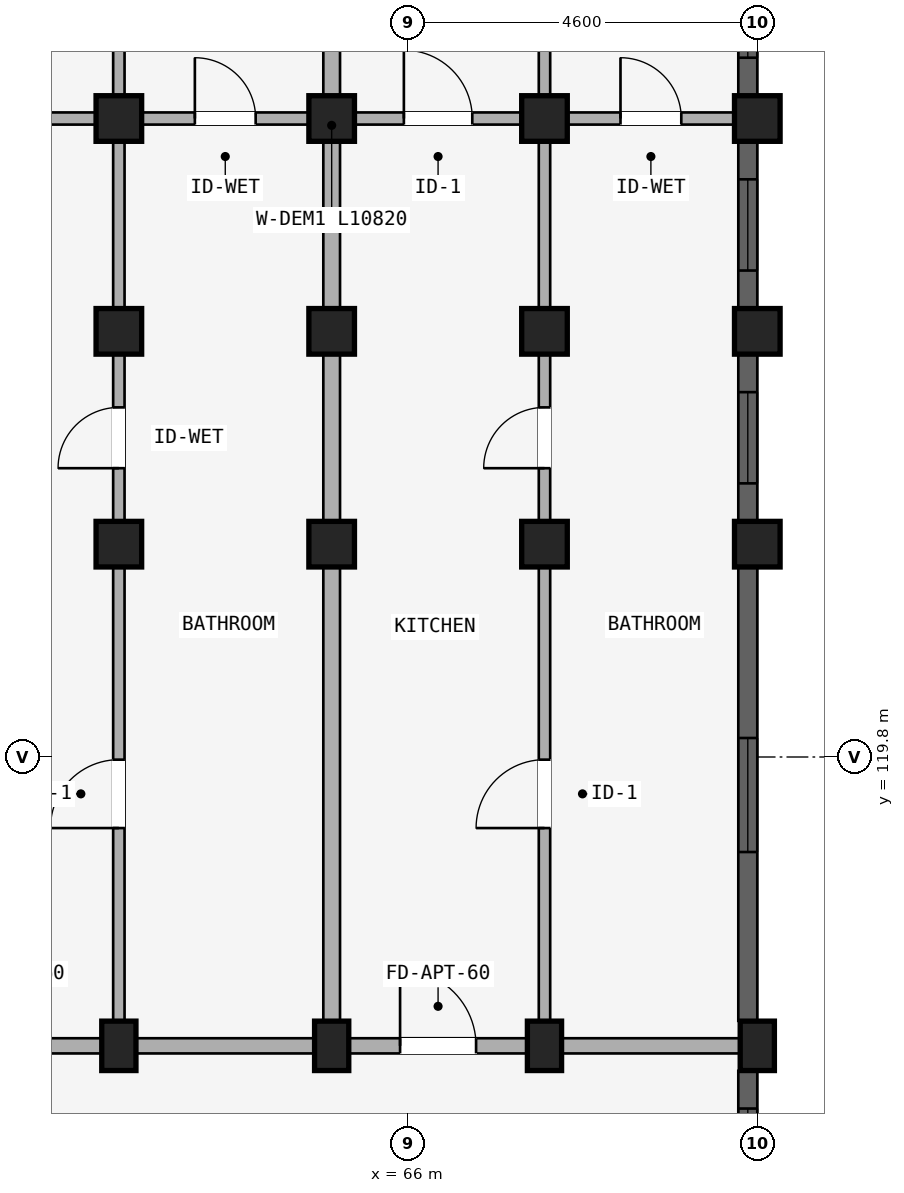
"""IFC4 building model, lengths in metres.
Left out: names, types, materials, properties, quantities, classifications, styles, units other than length and angle.
Written with IfcOpenShell. Run it as: python <this file> out.ifc"""

import sys

from ifc_helpers import new_model, si_unit, direction, frame, frame_2d, origin, origin_2d, place, context, subcontext, project, spatial, rectangle, extrude, element, fill, save


model = new_model("IFC4")
c1 = context("Model", 3, precision=1e-05, world=origin(), true_north=direction((0.0, 1.0)))
c2 = subcontext(c1, "Body", "Model", "MODEL_VIEW")
j1 = project(units=[si_unit("LENGTHUNIT", "METRE"), si_unit("PLANEANGLEUNIT", "RADIAN")], contexts=[c1])
p1 = place(None, origin())
s1 = spatial("IfcSite", under=j1, at=p1, CompositionType="ELEMENT")
p2 = place(p1, origin())
s2 = spatial("IfcBuilding", under=s1, at=p2, CompositionType="ELEMENT")
p3 = place(p2, frame((0.0, 0.0, 30.75)))
s3 = spatial("IfcBuildingStorey", under=s2, at=p3, CompositionType="ELEMENT", Elevation=30.75)
p4 = place(p3, frame((62.2, 116.0, 0.0), z_axis=(0.0, 0.0, 1.0), x_axis=(1.0, 0.0, 0.0)))
e1 = element("IfcColumn", 1, at=p4, inside=s3, PredefinedType="COLUMN", context=c2, shape_type="SweptSolid", body=[
    extrude(rectangle(XDim=0.45, YDim=0.65, at=origin_2d()), origin(), (0.0, 0.0, 1.0), 2.93),
])
for number, where, z_axis, x_axis in (
    (2, (62.2, 122.6, 0.0), (0.0, 0.0, 1.0), (1.0, 0.0, 0.0)),
    (3, (62.2, 125.4, 0.0), (0.0, 0.0, 1.0), (1.0, 0.0, 0.0)),
    (4, (62.2, 128.2, 0.0), (0.0, 0.0, 1.0), (1.0, 0.0, 0.0)),
):
    element("IfcColumn", number, at=place(p3, frame(where, z_axis=z_axis, x_axis=x_axis)), inside=s3, PredefinedType="COLUMN", context=c2, shape_type="SweptSolid", body=[
        extrude(rectangle(XDim=0.6, YDim=0.6, at=origin_2d()), origin(), (0.0, 0.0, 1.0), 2.93),
    ])
p5 = place(p3, frame((65.0, 116.0, 0.0), z_axis=(0.0, 0.0, 1.0), x_axis=(1.0, 0.0, 0.0)))
e5 = element("IfcColumn", 5, at=p5, inside=s3, PredefinedType="COLUMN", context=c2, shape_type="SweptSolid", body=[
    extrude(rectangle(XDim=0.45, YDim=0.65, at=origin_2d()), origin(), (0.0, 0.0, 1.0), 2.93),
])
for number, where, z_axis, x_axis in (
    (6, (65.0, 122.6, 0.0), (0.0, 0.0, 1.0), (1.0, 0.0, 0.0)),
    (7, (65.0, 125.4, 0.0), (0.0, 0.0, 1.0), (1.0, 0.0, 0.0)),
    (8, (65.0, 128.2, 0.0), (0.0, 0.0, 1.0), (1.0, 0.0, 0.0)),
):
    element("IfcColumn", number, at=place(p3, frame(where, z_axis=z_axis, x_axis=x_axis)), inside=s3, PredefinedType="COLUMN", context=c2, shape_type="SweptSolid", body=[
        extrude(rectangle(XDim=0.6, YDim=0.6, at=origin_2d()), origin(), (0.0, 0.0, 1.0), 2.93),
    ])
p6 = place(p3, frame((67.8, 116.0, 0.0), z_axis=(0.0, 0.0, 1.0), x_axis=(1.0, 0.0, 0.0)))
e9 = element("IfcColumn", 9, at=p6, inside=s3, PredefinedType="COLUMN", context=c2, shape_type="SweptSolid", body=[
    extrude(rectangle(XDim=0.45, YDim=0.65, at=origin_2d()), origin(), (0.0, 0.0, 1.0), 2.93),
])
for number, where, z_axis, x_axis in (
    (10, (67.8, 122.6, 0.0), (0.0, 0.0, 1.0), (1.0, 0.0, 0.0)),
    (11, (67.8, 125.4, 0.0), (0.0, 0.0, 1.0), (1.0, 0.0, 0.0)),
    (12, (67.8, 128.2, 0.0), (0.0, 0.0, 1.0), (1.0, 0.0, 0.0)),
):
    element("IfcColumn", number, at=place(p3, frame(where, z_axis=z_axis, x_axis=x_axis)), inside=s3, PredefinedType="COLUMN", context=c2, shape_type="SweptSolid", body=[
        extrude(rectangle(XDim=0.6, YDim=0.6, at=origin_2d()), origin(), (0.0, 0.0, 1.0), 2.93),
    ])
p7 = place(p3, frame((70.6, 116.0, 0.0), z_axis=(0.0, 0.0, 1.0), x_axis=(1.0, 0.0, 0.0)))
e13 = element("IfcColumn", 13, at=p7, inside=s3, PredefinedType="COLUMN", context=c2, shape_type="SweptSolid", body=[
    extrude(rectangle(XDim=0.45, YDim=0.65, at=origin_2d()), origin(), (0.0, 0.0, 1.0), 2.93),
])
for number, where, z_axis, x_axis in (
    (14, (70.6, 122.6, 0.0), (0.0, 0.0, 1.0), (1.0, 0.0, 0.0)),
    (15, (70.6, 125.4, 0.0), (0.0, 0.0, 1.0), (1.0, 0.0, 0.0)),
    (16, (70.6, 128.2, 0.0), (0.0, 0.0, 1.0), (1.0, 0.0, 0.0)),
):
    element("IfcColumn", number, at=place(p3, frame(where, z_axis=z_axis, x_axis=x_axis)), inside=s3, PredefinedType="COLUMN", context=c2, shape_type="SweptSolid", body=[
        extrude(rectangle(XDim=0.6, YDim=0.6, at=origin_2d()), origin(), (0.0, 0.0, 1.0), 2.93),
    ])
p8 = place(p3, frame((59.4, 116.0, 0.0), z_axis=(0.0, 0.0, 1.0), x_axis=(1.0, 0.0, 0.0)))
e17 = element("IfcWall", 17, at=p8, inside=s3, PredefinedType="STANDARD", context=c2, shape_type="SweptSolid", body=[
    extrude(rectangle(XDim=2.8, YDim=0.2, at=frame_2d((1.4, 0.0))), origin(), (0.0, 0.0, 1.0), 2.372),
])
p9 = place(p8, frame((0.9, 0.0, 0.0)))
e18 = element("IfcOpeningElement", 18, at=p9, cuts=e17, PredefinedType="OPENING", context=c2, shape_type="SweptSolid", body=[
    extrude(rectangle(XDim=1.0, YDim=2.15, at=frame_2d((0.5, 1.075))), frame((0.0, 0.11, 0.0), z_axis=(0.0, -1.0, 0.0), x_axis=(1.0, 0.0, 0.0)), (0.0, 0.0, 1.0), 0.22),
])
p10 = place(p3, frame((59.48, 128.2, 0.0), z_axis=(0.0, 0.0, 1.0), x_axis=(1.0, 0.0, 0.0)))
e19 = element("IfcWall", 19, at=p10, inside=s3, PredefinedType="PLUMBINGWALL", context=c2, shape_type="SweptSolid", body=[
    extrude(rectangle(XDim=2.64, YDim=0.16, at=frame_2d((1.32, 0.0))), origin(), (0.0, 0.0, 1.0), 2.372),
])
p11 = place(p10, frame((0.87, 0.0, 0.0)))
e20 = element("IfcOpeningElement", 20, at=p11, cuts=e19, PredefinedType="OPENING", context=c2, shape_type="SweptSolid", body=[
    extrude(rectangle(XDim=0.9, YDim=2.1, at=frame_2d((0.45, 1.05))), frame((0.0, 0.09, 0.0), z_axis=(0.0, -1.0, 0.0), x_axis=(1.0, 0.0, 0.0)), (0.0, 0.0, 1.0), 0.18),
])
p12 = place(p3, frame((62.2, 116.0, 0.0), z_axis=(0.0, 0.0, 1.0), x_axis=(1.0, 0.0, 0.0)))
e21 = element("IfcWall", 21, at=p12, inside=s3, PredefinedType="STANDARD", context=c2, shape_type="SweptSolid", body=[
    extrude(rectangle(XDim=2.8, YDim=0.2, at=frame_2d((1.4, 0.0))), origin(), (0.0, 0.0, 1.0), 2.372),
])
p13 = place(p3, frame((62.28, 128.2, 0.0), z_axis=(0.0, 0.0, 1.0), x_axis=(1.0, 0.0, 0.0)))
e22 = element("IfcWall", 22, at=p13, inside=s3, PredefinedType="PLUMBINGWALL", context=c2, shape_type="SweptSolid", body=[
    extrude(rectangle(XDim=2.64, YDim=0.16, at=frame_2d((1.32, 0.0))), origin(), (0.0, 0.0, 1.0), 2.372),
])
p14 = place(p13, frame((0.92, 0.0, 0.0)))
e23 = element("IfcOpeningElement", 23, at=p14, cuts=e22, PredefinedType="OPENING", context=c2, shape_type="SweptSolid", body=[
    extrude(rectangle(XDim=0.8, YDim=2.1, at=frame_2d((0.4, 1.05))), frame((0.0, 0.09, 0.0), z_axis=(0.0, -1.0, 0.0), x_axis=(1.0, 0.0, 0.0)), (0.0, 0.0, 1.0), 0.18),
])
p15 = place(p3, frame((65.0, 116.0, 0.0), z_axis=(0.0, 0.0, 1.0), x_axis=(1.0, 0.0, 0.0)))
e24 = element("IfcWall", 24, at=p15, inside=s3, PredefinedType="STANDARD", context=c2, shape_type="SweptSolid", body=[
    extrude(rectangle(XDim=2.8, YDim=0.2, at=frame_2d((1.4, 0.0))), origin(), (0.0, 0.0, 1.0), 2.372),
])
p16 = place(p15, frame((0.9, 0.0, 0.0)))
e25 = element("IfcOpeningElement", 25, at=p16, cuts=e24, PredefinedType="OPENING", context=c2, shape_type="SweptSolid", body=[
    extrude(rectangle(XDim=1.0, YDim=2.15, at=frame_2d((0.5, 1.075))), frame((0.0, 0.11, 0.0), z_axis=(0.0, -1.0, 0.0), x_axis=(1.0, 0.0, 0.0)), (0.0, 0.0, 1.0), 0.22),
])
p17 = place(p3, frame((65.08, 128.2, 0.0), z_axis=(0.0, 0.0, 1.0), x_axis=(1.0, 0.0, 0.0)))
e26 = element("IfcWall", 26, at=p17, inside=s3, PredefinedType="PLUMBINGWALL", context=c2, shape_type="SweptSolid", body=[
    extrude(rectangle(XDim=2.64, YDim=0.16, at=frame_2d((1.32, 0.0))), origin(), (0.0, 0.0, 1.0), 2.372),
])
p18 = place(p17, frame((0.87, 0.0, 0.0)))
e27 = element("IfcOpeningElement", 27, at=p18, cuts=e26, PredefinedType="OPENING", context=c2, shape_type="SweptSolid", body=[
    extrude(rectangle(XDim=0.9, YDim=2.1, at=frame_2d((0.45, 1.05))), frame((0.0, 0.09, 0.0), z_axis=(0.0, -1.0, 0.0), x_axis=(1.0, 0.0, 0.0)), (0.0, 0.0, 1.0), 0.18),
])
p19 = place(p3, frame((67.8, 116.0, 0.0), z_axis=(0.0, 0.0, 1.0), x_axis=(1.0, 0.0, 0.0)))
e28 = element("IfcWall", 28, at=p19, inside=s3, PredefinedType="STANDARD", context=c2, shape_type="SweptSolid", body=[
    extrude(rectangle(XDim=2.8, YDim=0.2, at=frame_2d((1.4, 0.0))), origin(), (0.0, 0.0, 1.0), 2.372),
])
p20 = place(p3, frame((67.88, 128.2, 0.0), z_axis=(0.0, 0.0, 1.0), x_axis=(1.0, 0.0, 0.0)))
e29 = element("IfcWall", 29, at=p20, inside=s3, PredefinedType="PLUMBINGWALL", context=c2, shape_type="SweptSolid", body=[
    extrude(rectangle(XDim=2.64, YDim=0.16, at=frame_2d((1.32, 0.0))), origin(), (0.0, 0.0, 1.0), 2.372),
])
p21 = place(p20, frame((0.92, 0.0, 0.0)))
e30 = element("IfcOpeningElement", 30, at=p21, cuts=e29, PredefinedType="OPENING", context=c2, shape_type="SweptSolid", body=[
    extrude(rectangle(XDim=0.8, YDim=2.1, at=frame_2d((0.4, 1.05))), frame((0.0, 0.09, 0.0), z_axis=(0.0, -1.0, 0.0), x_axis=(1.0, 0.0, 0.0)), (0.0, 0.0, 1.0), 0.18),
])
p22 = place(p3, frame((62.2, 116.05, 0.0), z_axis=(0.0, 0.0, 1.0), x_axis=(0.0, 1.0, 0.0)))
e31 = element("IfcWall", 31, at=p22, inside=s3, PredefinedType="PARTITIONING", context=c2, shape_type="SweptSolid", body=[
    extrude(rectangle(XDim=6.53, YDim=0.15, at=frame_2d((3.265, 0.0))), origin(), (0.0, 0.0, 1.0), 2.372),
])
p23 = place(p22, frame((2.815, 0.0, 0.0)))
e32 = element("IfcOpeningElement", 32, at=p23, cuts=e31, PredefinedType="OPENING", context=c2, shape_type="SweptSolid", body=[
    extrude(rectangle(XDim=0.9, YDim=2.1, at=frame_2d((0.45, 1.05))), frame((0.0, 0.085, 0.0), z_axis=(0.0, -1.0, 0.0), x_axis=(1.0, 0.0, 0.0)), (0.0, 0.0, 1.0), 0.17),
])
p24 = place(p3, frame((62.2, 122.7, 0.0), z_axis=(0.0, 0.0, 1.0), x_axis=(0.0, 1.0, 0.0)))
e33 = element("IfcWall", 33, at=p24, inside=s3, PredefinedType="PARTITIONING", context=c2, shape_type="SweptSolid", body=[
    extrude(rectangle(XDim=10.82, YDim=0.15, at=frame_2d((5.41, 0.0))), origin(), (0.0, 0.0, 1.0), 2.372),
])
p25 = place(p24, frame((0.899, 0.0, 0.0)))
e34 = element("IfcOpeningElement", 34, at=p25, cuts=e33, PredefinedType="OPENING", context=c2, shape_type="SweptSolid", body=[
    extrude(rectangle(XDim=0.8, YDim=2.1, at=frame_2d((0.4, 1.05))), frame((0.0, 0.085, 0.0), z_axis=(0.0, -1.0, 0.0), x_axis=(1.0, 0.0, 0.0)), (0.0, 0.0, 1.0), 0.17),
])
p26 = place(p3, frame((65.0, 116.05, 0.0), z_axis=(0.0, 0.0, 1.0), x_axis=(0.0, 1.0, 0.0)))
e35 = element("IfcWall", 35, at=p26, inside=s3, PredefinedType="STANDARD", context=c2, shape_type="SweptSolid", body=[
    extrude(rectangle(XDim=6.53, YDim=0.22, at=frame_2d((3.265, 0.0))), origin(), (0.0, 0.0, 1.0), 2.372),
])
p27 = place(p3, frame((65.0, 122.7, 0.0), z_axis=(0.0, 0.0, 1.0), x_axis=(0.0, 1.0, 0.0)))
e36 = element("IfcWall", 36, at=p27, inside=s3, PredefinedType="STANDARD", context=c2, shape_type="SweptSolid", body=[
    extrude(rectangle(XDim=10.82, YDim=0.22, at=frame_2d((5.41, 0.0))), origin(), (0.0, 0.0, 1.0), 2.372),
])
p28 = place(p3, frame((67.8, 116.05, 0.0), z_axis=(0.0, 0.0, 1.0), x_axis=(0.0, 1.0, 0.0)))
e37 = element("IfcWall", 37, at=p28, inside=s3, PredefinedType="PARTITIONING", context=c2, shape_type="SweptSolid", body=[
    extrude(rectangle(XDim=6.53, YDim=0.15, at=frame_2d((3.265, 0.0))), origin(), (0.0, 0.0, 1.0), 2.372),
])
p29 = place(p28, frame((2.815, 0.0, 0.0)))
e38 = element("IfcOpeningElement", 38, at=p29, cuts=e37, PredefinedType="OPENING", context=c2, shape_type="SweptSolid", body=[
    extrude(rectangle(XDim=0.9, YDim=2.1, at=frame_2d((0.45, 1.05))), frame((0.0, 0.085, 0.0), z_axis=(0.0, -1.0, 0.0), x_axis=(1.0, 0.0, 0.0)), (0.0, 0.0, 1.0), 0.17),
])
p30 = place(p3, frame((67.8, 122.7, 0.0), z_axis=(0.0, 0.0, 1.0), x_axis=(0.0, 1.0, 0.0)))
e39 = element("IfcWall", 39, at=p30, inside=s3, PredefinedType="PARTITIONING", context=c2, shape_type="SweptSolid", body=[
    extrude(rectangle(XDim=10.82, YDim=0.15, at=frame_2d((5.41, 0.0))), origin(), (0.0, 0.0, 1.0), 2.372),
])
p31 = place(p30, frame((0.899, 0.0, 0.0)))
e40 = element("IfcOpeningElement", 40, at=p31, cuts=e39, PredefinedType="OPENING", context=c2, shape_type="SweptSolid", body=[
    extrude(rectangle(XDim=0.8, YDim=2.1, at=frame_2d((0.4, 1.05))), frame((0.0, 0.085, 0.0), z_axis=(0.0, -1.0, 0.0), x_axis=(1.0, 0.0, 0.0)), (0.0, 0.0, 1.0), 0.17),
])
p32 = place(p3, frame((70.475, 113.928, 0.0), z_axis=(0.0, 0.0, 1.0), x_axis=(0.0, 1.0, 0.0)))
e41 = element("IfcWall", 41, at=p32, inside=s3, PredefinedType="STANDARD", context=c2, shape_type="SweptSolid", body=[
    extrude(rectangle(XDim=1.743, YDim=0.25, at=frame_2d((0.872, 0.0))), origin(), (0.0, 0.0, 1.0), 2.372),
])
p33 = place(p32, frame((0.497, 0.0, 0.88)))
e42 = element("IfcOpeningElement", 42, at=p33, cuts=e41, PredefinedType="OPENING", context=c2, shape_type="SweptSolid", body=[
    extrude(rectangle(XDim=0.75, YDim=1.05, at=frame_2d((0.375, 0.525))), frame((0.0, 0.135, 0.0), z_axis=(0.0, -1.0, 0.0), x_axis=(1.0, 0.0, 0.0)), (0.0, 0.0, 1.0), 0.27),
])
p34 = place(p3, frame((70.475, 116.329, 0.0), z_axis=(0.0, 0.0, 1.0), x_axis=(0.0, 1.0, 0.0)))
e43 = element("IfcWall", 43, at=p34, inside=s3, PredefinedType="STANDARD", context=c2, shape_type="SweptSolid", body=[
    extrude(rectangle(XDim=5.968, YDim=0.25, at=frame_2d((2.984, 0.0))), origin(), (0.0, 0.0, 1.0), 2.372),
])
p35 = place(p34, frame((2.221, 0.0, 0.522)))
e44 = element("IfcOpeningElement", 44, at=p35, cuts=e43, PredefinedType="OPENING", context=c2, shape_type="SweptSolid", body=[
    extrude(rectangle(XDim=1.5, YDim=1.65, at=frame_2d((0.75, 0.825))), frame((0.0, 0.135, 0.0), z_axis=(0.0, -1.0, 0.0), x_axis=(1.0, 0.0, 0.0)), (0.0, 0.0, 1.0), 0.27),
])
p36 = place(p3, frame((70.475, 122.904, 0.0), z_axis=(0.0, 0.0, 1.0), x_axis=(0.0, 1.0, 0.0)))
e45 = element("IfcWall", 45, at=p36, inside=s3, PredefinedType="STANDARD", context=c2, shape_type="SweptSolid", body=[
    extrude(rectangle(XDim=2.193, YDim=0.25, at=frame_2d((1.096, 0.0))), origin(), (0.0, 0.0, 1.0), 2.372),
])
p37 = place(p36, frame((0.497, 0.0, 0.672)))
e46 = element("IfcOpeningElement", 46, at=p37, cuts=e45, PredefinedType="OPENING", context=c2, shape_type="SweptSolid", body=[
    extrude(rectangle(XDim=1.2, YDim=1.5, at=frame_2d((0.6, 0.75))), frame((0.0, 0.135, 0.0), z_axis=(0.0, -1.0, 0.0), x_axis=(1.0, 0.0, 0.0)), (0.0, 0.0, 1.0), 0.27),
])
p38 = place(p3, frame((70.475, 125.704, 0.0), z_axis=(0.0, 0.0, 1.0), x_axis=(0.0, 1.0, 0.0)))
e47 = element("IfcWall", 47, at=p38, inside=s3, PredefinedType="STANDARD", context=c2, shape_type="SweptSolid", body=[
    extrude(rectangle(XDim=2.193, YDim=0.25, at=frame_2d((1.096, 0.0))), origin(), (0.0, 0.0, 1.0), 2.372),
])
p39 = place(p38, frame((0.497, 0.0, 0.672)))
e48 = element("IfcOpeningElement", 48, at=p39, cuts=e47, PredefinedType="OPENING", context=c2, shape_type="SweptSolid", body=[
    extrude(rectangle(XDim=1.2, YDim=1.5, at=frame_2d((0.6, 0.75))), frame((0.0, 0.135, 0.0), z_axis=(0.0, -1.0, 0.0), x_axis=(1.0, 0.0, 0.0)), (0.0, 0.0, 1.0), 0.27),
])
p40 = place(p3, frame((70.475, 128.503, 0.0), z_axis=(0.0, 0.0, 1.0), x_axis=(0.0, 1.0, 0.0)))
e49 = element("IfcWall", 49, at=p40, inside=s3, PredefinedType="STANDARD", context=c2, shape_type="SweptSolid", body=[
    extrude(rectangle(XDim=2.193, YDim=0.25, at=frame_2d((1.097, 0.0))), origin(), (0.0, 0.0, 1.0), 2.372),
])
p41 = place(p40, frame((0.497, 0.0, 0.672)))
e50 = element("IfcOpeningElement", 50, at=p41, cuts=e49, PredefinedType="OPENING", context=c2, shape_type="SweptSolid", body=[
    extrude(rectangle(XDim=1.2, YDim=1.5, at=frame_2d((0.6, 0.75))), frame((0.0, 0.135, 0.0), z_axis=(0.0, -1.0, 0.0), x_axis=(1.0, 0.0, 0.0)), (0.0, 0.0, 1.0), 0.27),
])
p42 = place(p33, origin())
e51 = element("IfcWindow", 51, at=p42, inside=s3, PartitioningType="SINGLE_PANEL", PredefinedType="WINDOW", context=c2, shape_type="SweptSolid", body=[
    extrude(rectangle(XDim=0.75, YDim=1.05, at=frame_2d((0.375, 0.525))), frame((0.0, 0.03, 0.0), z_axis=(0.0, -1.0, 0.0), x_axis=(1.0, 0.0, 0.0)), (0.0, 0.0, 1.0), 0.06),
])
fill(e42, e51)
p43 = place(p35, origin())
e52 = element("IfcWindow", 52, at=p43, inside=s3, PartitioningType="DOUBLE_PANEL_VERTICAL", PredefinedType="WINDOW", context=c2, shape_type="SweptSolid", body=[
    extrude(rectangle(XDim=1.5, YDim=1.65, at=frame_2d((0.75, 0.825))), frame((0.0, 0.03, 0.0), z_axis=(0.0, -1.0, 0.0), x_axis=(1.0, 0.0, 0.0)), (0.0, 0.0, 1.0), 0.06),
])
fill(e44, e52)
p44 = place(p37, origin())
e53 = element("IfcWindow", 53, at=p44, inside=s3, PartitioningType="SINGLE_PANEL", PredefinedType="WINDOW", context=c2, shape_type="SweptSolid", body=[
    extrude(rectangle(XDim=1.2, YDim=1.5, at=frame_2d((0.6, 0.75))), frame((0.0, 0.03, 0.0), z_axis=(0.0, -1.0, 0.0), x_axis=(1.0, 0.0, 0.0)), (0.0, 0.0, 1.0), 0.06),
])
fill(e46, e53)
p45 = place(p39, origin())
e54 = element("IfcWindow", 54, at=p45, inside=s3, PartitioningType="SINGLE_PANEL", PredefinedType="WINDOW", context=c2, shape_type="SweptSolid", body=[
    extrude(rectangle(XDim=1.2, YDim=1.5, at=frame_2d((0.6, 0.75))), frame((0.0, 0.03, 0.0), z_axis=(0.0, -1.0, 0.0), x_axis=(1.0, 0.0, 0.0)), (0.0, 0.0, 1.0), 0.06),
])
fill(e48, e54)
p46 = place(p41, origin())
e55 = element("IfcWindow", 55, at=p46, inside=s3, PartitioningType="SINGLE_PANEL", PredefinedType="WINDOW", context=c2, shape_type="SweptSolid", body=[
    extrude(rectangle(XDim=1.2, YDim=1.5, at=frame_2d((0.6, 0.75))), frame((0.0, 0.03, 0.0), z_axis=(0.0, -1.0, 0.0), x_axis=(1.0, 0.0, 0.0)), (0.0, 0.0, 1.0), 0.06),
])
fill(e50, e55)
p47 = place(p14, origin())
e56 = element("IfcDoor", 56, at=p47, inside=s3, OperationType="SINGLE_SWING_LEFT", PredefinedType="DOOR", context=c2, shape_type="SweptSolid", body=[
    extrude(rectangle(XDim=0.8, YDim=2.1, at=frame_2d((0.4, 1.05))), frame((0.0, 0.025, 0.0), z_axis=(0.0, -1.0, 0.0), x_axis=(1.0, 0.0, 0.0)), (0.0, 0.0, 1.0), 0.05),
])
fill(e23, e56)
p48 = place(p18, origin())
e57 = element("IfcDoor", 57, at=p48, inside=s3, OperationType="SINGLE_SWING_LEFT", PredefinedType="DOOR", context=c2, shape_type="SweptSolid", body=[
    extrude(rectangle(XDim=0.9, YDim=2.1, at=frame_2d((0.45, 1.05))), frame((0.0, 0.025, 0.0), z_axis=(0.0, -1.0, 0.0), x_axis=(1.0, 0.0, 0.0)), (0.0, 0.0, 1.0), 0.05),
])
fill(e27, e57)
p49 = place(p16, frame((1.0, 0.0, 0.0), z_axis=(0.0, 0.0, 1.0), x_axis=(-1.0, 0.0, 0.0)))
e58 = element("IfcDoor", 58, at=p49, inside=s3, OperationType="SINGLE_SWING_RIGHT", PredefinedType="DOOR", context=c2, shape_type="SweptSolid", body=[
    extrude(rectangle(XDim=1.0, YDim=2.15, at=frame_2d((0.5, 1.075))), frame((0.0, 0.025, 0.0), z_axis=(0.0, -1.0, 0.0), x_axis=(1.0, 0.0, 0.0)), (0.0, 0.0, 1.0), 0.05),
])
fill(e25, e58)
p50 = place(p21, origin())
e59 = element("IfcDoor", 59, at=p50, inside=s3, OperationType="SINGLE_SWING_LEFT", PredefinedType="DOOR", context=c2, shape_type="SweptSolid", body=[
    extrude(rectangle(XDim=0.8, YDim=2.1, at=frame_2d((0.4, 1.05))), frame((0.0, 0.025, 0.0), z_axis=(0.0, -1.0, 0.0), x_axis=(1.0, 0.0, 0.0)), (0.0, 0.0, 1.0), 0.05),
])
fill(e30, e59)
p51 = place(p23, frame((0.9, 0.0, 0.0), z_axis=(0.0, 0.0, 1.0), x_axis=(-1.0, 0.0, 0.0)))
e60 = element("IfcDoor", 60, at=p51, inside=s3, OperationType="SINGLE_SWING_RIGHT", PredefinedType="DOOR", context=c2, shape_type="SweptSolid", body=[
    extrude(rectangle(XDim=0.9, YDim=2.1, at=frame_2d((0.45, 1.05))), frame((0.0, 0.025, 0.0), z_axis=(0.0, -1.0, 0.0), x_axis=(1.0, 0.0, 0.0)), (0.0, 0.0, 1.0), 0.05),
])
fill(e32, e60)
p52 = place(p25, origin())
e61 = element("IfcDoor", 61, at=p52, inside=s3, OperationType="SINGLE_SWING_LEFT", PredefinedType="DOOR", context=c2, shape_type="SweptSolid", body=[
    extrude(rectangle(XDim=0.8, YDim=2.1, at=frame_2d((0.4, 1.05))), frame((0.0, 0.025, 0.0), z_axis=(0.0, -1.0, 0.0), x_axis=(1.0, 0.0, 0.0)), (0.0, 0.0, 1.0), 0.05),
])
fill(e34, e61)
p53 = place(p29, origin())
e62 = element("IfcDoor", 62, at=p53, inside=s3, OperationType="SINGLE_SWING_LEFT", PredefinedType="DOOR", context=c2, shape_type="SweptSolid", body=[
    extrude(rectangle(XDim=0.9, YDim=2.1, at=frame_2d((0.45, 1.05))), frame((0.0, 0.025, 0.0), z_axis=(0.0, -1.0, 0.0), x_axis=(1.0, 0.0, 0.0)), (0.0, 0.0, 1.0), 0.05),
])
fill(e38, e62)
p54 = place(p31, frame((0.8, 0.0, 0.0), z_axis=(0.0, 0.0, 1.0), x_axis=(-1.0, 0.0, 0.0)))
e63 = element("IfcDoor", 63, at=p54, inside=s3, OperationType="SINGLE_SWING_RIGHT", PredefinedType="DOOR", context=c2, shape_type="SweptSolid", body=[
    extrude(rectangle(XDim=0.8, YDim=2.1, at=frame_2d((0.4, 1.05))), frame((0.0, 0.025, 0.0), z_axis=(0.0, -1.0, 0.0), x_axis=(1.0, 0.0, 0.0)), (0.0, 0.0, 1.0), 0.05),
])
fill(e40, e63)
save(model, sys.argv[1])
